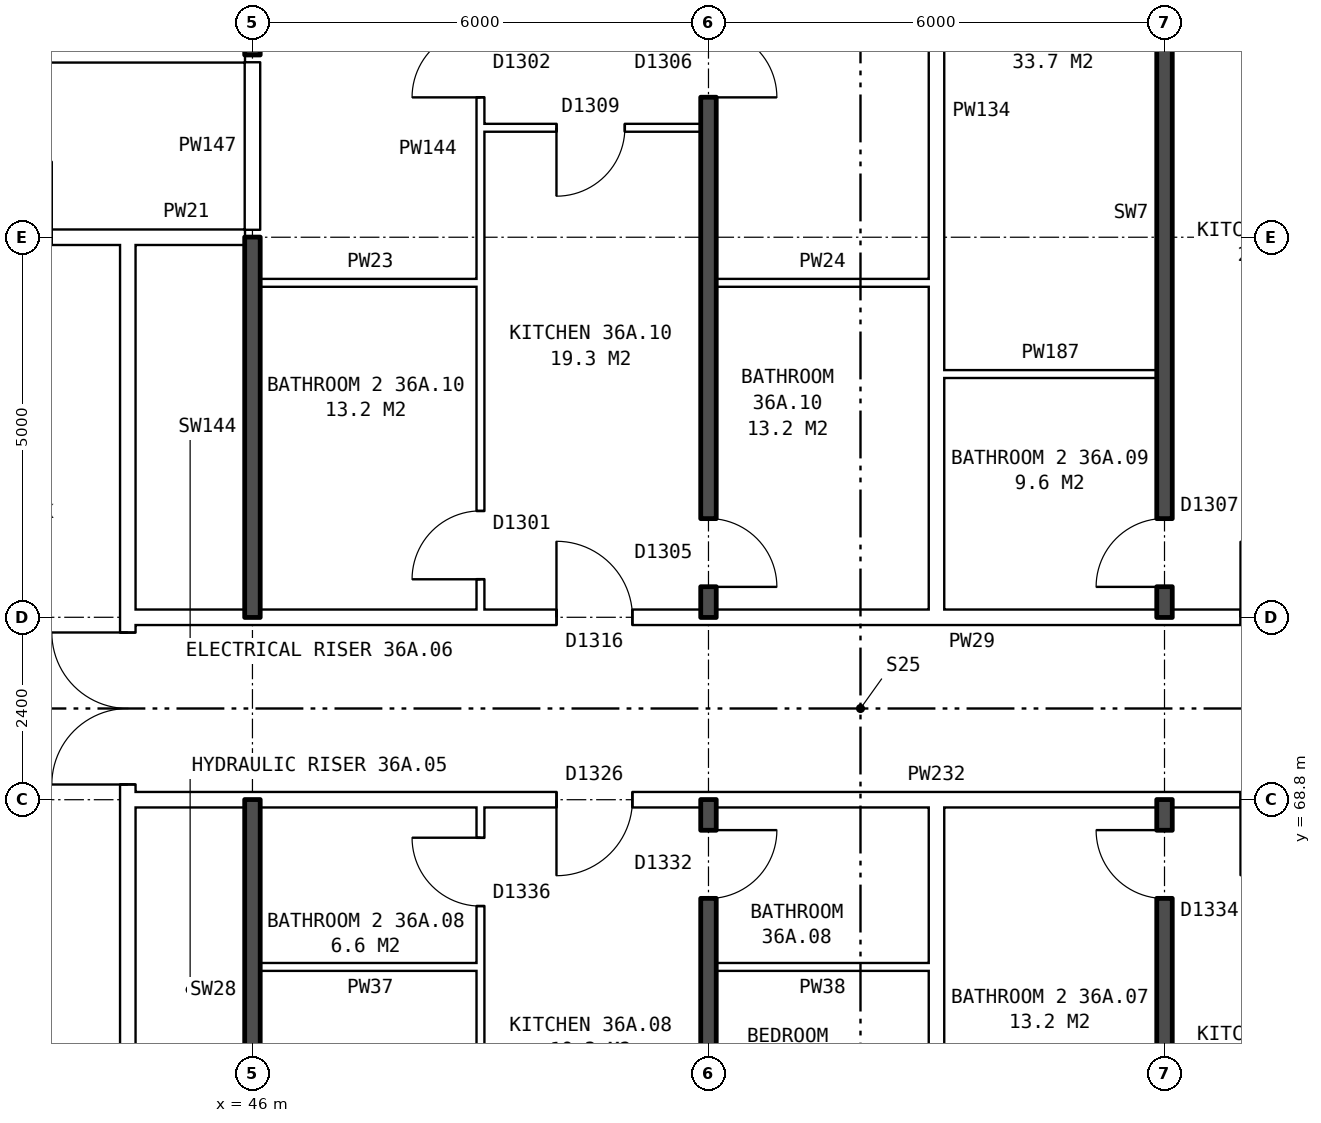
"""IFC4 building model, lengths in metres.
Left out: names, types, materials, properties, quantities, classifications, styles, units other than length and angle.
Written with IfcOpenShell. Run it as: python <this file> out.ifc"""

import sys

from ifc_helpers import new_model, si_unit, direction, frame, frame_2d, origin, place, context, subcontext, project, spatial, rectangle, extrude, element, fill, save


model = new_model("IFC4")
c1 = context("Model", 3, precision=1e-05, world=origin(), true_north=direction((0.0, 1.0)))
c2 = subcontext(c1, "Body", "Model", "MODEL_VIEW")
j1 = project(units=[si_unit("LENGTHUNIT", "METRE"), si_unit("PLANEANGLEUNIT", "RADIAN")], contexts=[c1])
p1 = place(None, origin())
s1 = spatial("IfcSite", under=j1, at=p1, CompositionType="ELEMENT")
p2 = place(p1, origin())
s2 = spatial("IfcBuilding", under=s1, at=p2, CompositionType="ELEMENT")
p3 = place(p2, frame((0.0, 0.0, 129.9)))
s3 = spatial("IfcBuildingStorey", under=s2, at=p3, CompositionType="ELEMENT", Elevation=129.9)
p4 = place(p3, frame((44.36, 63.9, 0.0), z_axis=(0.0, 0.0, 1.0), x_axis=(0.0, 1.0, 0.0)))
e1 = element("IfcWall", 1, at=p4, inside=s3, PredefinedType="PARTITIONING", context=c2, shape_type="SweptSolid", body=[
    extrude(rectangle(XDim=12.2, YDim=0.2, at=frame_2d((6.1, 0.0))), origin(), (0.0, 0.0, 1.0), 2.85),
])
p5 = place(p4, frame((5.1, 0.0, 0.0)))
e2 = element("IfcOpeningElement", 2, at=p5, cuts=e1, PredefinedType="OPENING", context=c2, shape_type="SweptSolid", body=[
    extrude(rectangle(XDim=2.0, YDim=2.1, at=frame_2d((1.0, 1.05))), frame((0.0, 0.11, 0.0), z_axis=(0.0, -1.0, 0.0), x_axis=(1.0, 0.0, 0.0)), (0.0, 0.0, 1.0), 0.22),
])
p6 = place(p3, frame((46.1, 66.6, 0.0), z_axis=(0.0, 0.0, 1.0), x_axis=(1.0, 0.0, 0.0)))
e3 = element("IfcWall", 3, at=p6, inside=s3, PredefinedType="PARTITIONING", context=c2, shape_type="SweptSolid", body=[
    extrude(rectangle(XDim=2.9, YDim=0.1, at=frame_2d((1.45, 0.0))), origin(), (0.0, 0.0, 1.0), 2.85),
])
p7 = place(p3, frame((52.1, 66.6, 0.0), z_axis=(0.0, 0.0, 1.0), x_axis=(1.0, 0.0, 0.0)))
e4 = element("IfcWall", 4, at=p7, inside=s3, PredefinedType="PARTITIONING", context=c2, shape_type="SweptSolid", body=[
    extrude(rectangle(XDim=2.8, YDim=0.1, at=frame_2d((1.4, 0.0))), origin(), (0.0, 0.0, 1.0), 2.85),
])
p8 = place(p3, frame((44.36, 68.8, 0.0), z_axis=(0.0, 0.0, 1.0), x_axis=(1.0, 0.0, 0.0)))
e5 = element("IfcWall", 5, at=p8, inside=s3, PredefinedType="PARTITIONING", context=c2, shape_type="SweptSolid", body=[
    extrude(rectangle(XDim=19.28, YDim=0.2, at=frame_2d((9.64, 0.0))), origin(), (0.0, 0.0, 1.0), 2.85),
])
p9 = place(p8, frame((14.64, 0.0, 0.0)))
e6 = element("IfcOpeningElement", 6, at=p9, cuts=e5, PredefinedType="OPENING", context=c2, shape_type="SweptSolid", body=[
    extrude(rectangle(XDim=1.0, YDim=2.1, at=frame_2d((0.5, 1.05))), frame((0.0, 0.11, 0.0), z_axis=(0.0, -1.0, 0.0), x_axis=(1.0, 0.0, 0.0)), (0.0, 0.0, 1.0), 0.22),
])
p10 = place(p8, frame((5.64, 0.0, 0.0)))
e7 = element("IfcOpeningElement", 7, at=p10, cuts=e5, PredefinedType="OPENING", context=c2, shape_type="SweptSolid", body=[
    extrude(rectangle(XDim=1.0, YDim=2.1, at=frame_2d((0.5, 1.05))), frame((0.0, 0.11, 0.0), z_axis=(0.0, -1.0, 0.0), x_axis=(1.0, 0.0, 0.0)), (0.0, 0.0, 1.0), 0.22),
])
p11 = place(p3, frame((44.36, 71.2, 0.0), z_axis=(0.0, 0.0, 1.0), x_axis=(1.0, 0.0, 0.0)))
e8 = element("IfcWall", 8, at=p11, inside=s3, PredefinedType="PARTITIONING", context=c2, shape_type="SweptSolid", body=[
    extrude(rectangle(XDim=19.28, YDim=0.2, at=frame_2d((9.64, 0.0))), origin(), (0.0, 0.0, 1.0), 2.85),
])
p12 = place(p11, frame((14.64, 0.0, 0.0)))
e9 = element("IfcOpeningElement", 9, at=p12, cuts=e8, PredefinedType="OPENING", context=c2, shape_type="SweptSolid", body=[
    extrude(rectangle(XDim=1.0, YDim=2.1, at=frame_2d((0.5, 1.05))), frame((0.0, 0.11, 0.0), z_axis=(0.0, -1.0, 0.0), x_axis=(1.0, 0.0, 0.0)), (0.0, 0.0, 1.0), 0.22),
])
p13 = place(p11, frame((5.64, 0.0, 0.0)))
e10 = element("IfcOpeningElement", 10, at=p13, cuts=e8, PredefinedType="OPENING", context=c2, shape_type="SweptSolid", body=[
    extrude(rectangle(XDim=1.0, YDim=2.1, at=frame_2d((0.5, 1.05))), frame((0.0, 0.11, 0.0), z_axis=(0.0, -1.0, 0.0), x_axis=(1.0, 0.0, 0.0)), (0.0, 0.0, 1.0), 0.22),
])
p14 = place(p3, frame((55.1, 74.4, 0.0), z_axis=(0.0, 0.0, 1.0), x_axis=(1.0, 0.0, 0.0)))
e11 = element("IfcWall", 11, at=p14, inside=s3, PredefinedType="PARTITIONING", context=c2, shape_type="SweptSolid", body=[
    extrude(rectangle(XDim=2.8, YDim=0.1, at=frame_2d((1.4, 0.0))), origin(), (0.0, 0.0, 1.0), 2.85),
])
p15 = place(p3, frame((46.1, 75.6, 0.0), z_axis=(0.0, 0.0, 1.0), x_axis=(1.0, 0.0, 0.0)))
e12 = element("IfcWall", 12, at=p15, inside=s3, PredefinedType="PARTITIONING", context=c2, shape_type="SweptSolid", body=[
    extrude(rectangle(XDim=2.9, YDim=0.1, at=frame_2d((1.45, 0.0))), origin(), (0.0, 0.0, 1.0), 2.85),
])
p16 = place(p3, frame((52.1, 75.6, 0.0), z_axis=(0.0, 0.0, 1.0), x_axis=(1.0, 0.0, 0.0)))
e13 = element("IfcWall", 13, at=p16, inside=s3, PredefinedType="PARTITIONING", context=c2, shape_type="SweptSolid", body=[
    extrude(rectangle(XDim=2.8, YDim=0.1, at=frame_2d((1.4, 0.0))), origin(), (0.0, 0.0, 1.0), 2.85),
])
p17 = place(p3, frame((41.36, 76.2, 0.0), z_axis=(0.0, 0.0, 1.0), x_axis=(1.0, 0.0, 0.0)))
e14 = element("IfcWall", 14, at=p17, inside=s3, PredefinedType="PARTITIONING", context=c2, shape_type="SweptSolid", body=[
    extrude(rectangle(XDim=3.0, YDim=0.2, at=frame_2d((1.5, 0.0))), origin(), (0.0, 0.0, 1.0), 2.85),
])
p18 = place(p17, frame((1.0, 0.0, 0.0)))
e15 = element("IfcOpeningElement", 15, at=p18, cuts=e14, PredefinedType="OPENING", context=c2, shape_type="SweptSolid", body=[
    extrude(rectangle(XDim=1.0, YDim=2.1, at=frame_2d((0.5, 1.05))), frame((0.0, 0.11, 0.0), z_axis=(0.0, -1.0, 0.0), x_axis=(1.0, 0.0, 0.0)), (0.0, 0.0, 1.0), 0.22),
])
p19 = place(p3, frame((44.36, 76.2, 0.0), z_axis=(0.0, 0.0, 1.0), x_axis=(1.0, 0.0, 0.0)))
e16 = element("IfcWall", 16, at=p19, inside=s3, PredefinedType="PARTITIONING", context=c2, shape_type="SweptSolid", body=[
    extrude(rectangle(XDim=1.54, YDim=0.2, at=frame_2d((0.77, 0.0))), origin(), (0.0, 0.0, 1.0), 2.85),
])
p20 = place(p3, frame((49.0, 77.64, 0.0), z_axis=(0.0, 0.0, 1.0), x_axis=(1.0, 0.0, 0.0)))
e17 = element("IfcWall", 17, at=p20, inside=s3, PredefinedType="PARTITIONING", context=c2, shape_type="SweptSolid", body=[
    extrude(rectangle(XDim=2.9, YDim=0.1, at=frame_2d((1.45, 0.0))), origin(), (0.0, 0.0, 1.0), 2.85),
])
p21 = place(p20, frame((1.0, 0.0, 0.0)))
e18 = element("IfcOpeningElement", 18, at=p21, cuts=e17, PredefinedType="OPENING", context=c2, shape_type="SweptSolid", body=[
    extrude(rectangle(XDim=0.9, YDim=2.1, at=frame_2d((0.45, 1.05))), frame((0.0, 0.06, 0.0), z_axis=(0.0, -1.0, 0.0), x_axis=(1.0, 0.0, 0.0)), (0.0, 0.0, 1.0), 0.12),
])
p22 = place(p3, frame((27.11, 78.6, 0.0), z_axis=(0.0, 0.0, 1.0), x_axis=(1.0, 0.0, 0.0)))
e19 = element("IfcWall", 19, at=p22, inside=s3, PredefinedType="PARTITIONING", context=c2, shape_type="SweptSolid", body=[
    extrude(rectangle(XDim=18.79, YDim=0.2, at=frame_2d((9.395, 0.0))), origin(), (0.0, 0.0, 1.0), 2.85),
])
p23 = place(p22, frame((14.19, 0.0, 0.0)))
e20 = element("IfcOpeningElement", 20, at=p23, cuts=e19, PredefinedType="OPENING", context=c2, shape_type="SweptSolid", body=[
    extrude(rectangle(XDim=1.0, YDim=2.1, at=frame_2d((0.5, 1.05))), frame((0.0, 0.11, 0.0), z_axis=(0.0, -1.0, 0.0), x_axis=(1.0, 0.0, 0.0)), (0.0, 0.0, 1.0), 0.22),
])
p24 = place(p22, frame((10.39, 0.0, 0.0)))
e21 = element("IfcOpeningElement", 21, at=p24, cuts=e19, PredefinedType="OPENING", context=c2, shape_type="SweptSolid", body=[
    extrude(rectangle(XDim=1.0, YDim=2.1, at=frame_2d((0.5, 1.05))), frame((0.0, 0.11, 0.0), z_axis=(0.0, -1.0, 0.0), x_axis=(1.0, 0.0, 0.0)), (0.0, 0.0, 1.0), 0.22),
])
p25 = place(p22, frame((4.59, 0.0, 0.0)))
e22 = element("IfcOpeningElement", 22, at=p25, cuts=e19, PredefinedType="OPENING", context=c2, shape_type="SweptSolid", body=[
    extrude(rectangle(XDim=1.0, YDim=2.1, at=frame_2d((0.5, 1.05))), frame((0.0, 0.11, 0.0), z_axis=(0.0, -1.0, 0.0), x_axis=(1.0, 0.0, 0.0)), (0.0, 0.0, 1.0), 0.22),
])
for number, where, z_axis, x_axis in (
    (23, (46.0, 63.8, 0.0), (0.0, 0.0, 1.0), (0.0, 1.0, 0.0)),
    (24, (46.0, 71.2, 0.0), (0.0, 0.0, 1.0), (0.0, 1.0, 0.0)),
):
    element("IfcWall", number, at=place(p3, frame(where, z_axis=z_axis, x_axis=x_axis)), inside=s3, PredefinedType="SOLIDWALL", context=c2, shape_type="SweptSolid", body=[
        extrude(rectangle(XDim=5.0, YDim=0.2, at=frame_2d((2.5, 0.0))), origin(), (0.0, 0.0, 1.0), 2.85),
    ])
p26 = place(p3, frame((46.0, 76.3, 0.0), z_axis=(0.0, 0.0, 1.0), x_axis=(0.0, 1.0, 0.0)))
e25 = element("IfcWall", 25, at=p26, inside=s3, PredefinedType="PARTITIONING", context=c2, shape_type="SweptSolid", body=[
    extrude(rectangle(XDim=2.2, YDim=0.2, at=frame_2d((1.1, 0.0))), origin(), (0.0, 0.0, 1.0), 2.85),
])
p27 = place(p3, frame((46.0, 78.6, 0.0), z_axis=(0.0, 0.0, 1.0), x_axis=(0.0, 1.0, 0.0)))
e26 = element("IfcWall", 26, at=p27, inside=s3, PredefinedType="SOLIDWALL", context=c2, shape_type="SweptSolid", body=[
    extrude(rectangle(XDim=7.04, YDim=0.2, at=frame_2d((3.52, 0.0))), origin(), (0.0, 0.0, 1.0), 2.85),
])
p28 = place(p3, frame((49.0, 54.36, 0.0), z_axis=(0.0, 0.0, 1.0), x_axis=(0.0, 1.0, 0.0)))
e27 = element("IfcWall", 27, at=p28, inside=s3, PredefinedType="PARTITIONING", context=c2, shape_type="SweptSolid", body=[
    extrude(rectangle(XDim=14.34, YDim=0.1, at=frame_2d((7.17, 0.0))), origin(), (0.0, 0.0, 1.0), 2.85),
])
p29 = place(p28, frame((6.7, 0.0, 0.0)))
e28 = element("IfcOpeningElement", 28, at=p29, cuts=e27, PredefinedType="OPENING", context=c2, shape_type="SweptSolid", body=[
    extrude(rectangle(XDim=0.9, YDim=2.1, at=frame_2d((0.45, 1.05))), frame((0.0, 0.06, 0.0), z_axis=(0.0, -1.0, 0.0), x_axis=(1.0, 0.0, 0.0)), (0.0, 0.0, 1.0), 0.12),
])
p30 = place(p28, frame((13.04, 0.0, 0.0)))
e29 = element("IfcOpeningElement", 29, at=p30, cuts=e27, PredefinedType="OPENING", context=c2, shape_type="SweptSolid", body=[
    extrude(rectangle(XDim=0.9, YDim=2.1, at=frame_2d((0.45, 1.05))), frame((0.0, 0.06, 0.0), z_axis=(0.0, -1.0, 0.0), x_axis=(1.0, 0.0, 0.0)), (0.0, 0.0, 1.0), 0.12),
])
p31 = place(p3, frame((49.0, 71.3, 0.0), z_axis=(0.0, 0.0, 1.0), x_axis=(0.0, 1.0, 0.0)))
e30 = element("IfcWall", 30, at=p31, inside=s3, PredefinedType="PARTITIONING", context=c2, shape_type="SweptSolid", body=[
    extrude(rectangle(XDim=14.34, YDim=0.1, at=frame_2d((7.17, 0.0))), origin(), (0.0, 0.0, 1.0), 2.85),
])
p32 = place(p31, frame((6.74, 0.0, 0.0)))
e31 = element("IfcOpeningElement", 31, at=p32, cuts=e30, PredefinedType="OPENING", context=c2, shape_type="SweptSolid", body=[
    extrude(rectangle(XDim=0.9, YDim=2.1, at=frame_2d((0.45, 1.05))), frame((0.0, 0.06, 0.0), z_axis=(0.0, -1.0, 0.0), x_axis=(1.0, 0.0, 0.0)), (0.0, 0.0, 1.0), 0.12),
])
p33 = place(p31, frame((0.4, 0.0, 0.0)))
e32 = element("IfcOpeningElement", 32, at=p33, cuts=e30, PredefinedType="OPENING", context=c2, shape_type="SweptSolid", body=[
    extrude(rectangle(XDim=0.9, YDim=2.1, at=frame_2d((0.45, 1.05))), frame((0.0, 0.06, 0.0), z_axis=(0.0, -1.0, 0.0), x_axis=(1.0, 0.0, 0.0)), (0.0, 0.0, 1.0), 0.12),
])
p34 = place(p3, frame((52.0, 54.36, 0.0), z_axis=(0.0, 0.0, 1.0), x_axis=(0.0, 1.0, 0.0)))
e33 = element("IfcWall", 33, at=p34, inside=s3, PredefinedType="SOLIDWALL", context=c2, shape_type="SweptSolid", body=[
    extrude(rectangle(XDim=14.44, YDim=0.2, at=frame_2d((7.22, 0.0))), origin(), (0.0, 0.0, 1.0), 2.85),
])
p35 = place(p34, frame((6.7, 0.0, 0.0)))
e34 = element("IfcOpeningElement", 34, at=p35, cuts=e33, PredefinedType="OPENING", context=c2, shape_type="SweptSolid", body=[
    extrude(rectangle(XDim=0.9, YDim=2.1, at=frame_2d((0.45, 1.05))), frame((0.0, 0.11, 0.0), z_axis=(0.0, -1.0, 0.0), x_axis=(1.0, 0.0, 0.0)), (0.0, 0.0, 1.0), 0.22),
])
p36 = place(p34, frame((13.14, 0.0, 0.0)))
e35 = element("IfcOpeningElement", 35, at=p36, cuts=e33, PredefinedType="OPENING", context=c2, shape_type="SweptSolid", body=[
    extrude(rectangle(XDim=0.9, YDim=2.1, at=frame_2d((0.45, 1.05))), frame((0.0, 0.11, 0.0), z_axis=(0.0, -1.0, 0.0), x_axis=(1.0, 0.0, 0.0)), (0.0, 0.0, 1.0), 0.22),
])
p37 = place(p3, frame((52.0, 71.2, 0.0), z_axis=(0.0, 0.0, 1.0), x_axis=(0.0, 1.0, 0.0)))
e36 = element("IfcWall", 36, at=p37, inside=s3, PredefinedType="SOLIDWALL", context=c2, shape_type="SweptSolid", body=[
    extrude(rectangle(XDim=14.44, YDim=0.2, at=frame_2d((7.22, 0.0))), origin(), (0.0, 0.0, 1.0), 2.85),
])
p38 = place(p37, frame((6.84, 0.0, 0.0)))
e37 = element("IfcOpeningElement", 37, at=p38, cuts=e36, PredefinedType="OPENING", context=c2, shape_type="SweptSolid", body=[
    extrude(rectangle(XDim=0.9, YDim=2.1, at=frame_2d((0.45, 1.05))), frame((0.0, 0.11, 0.0), z_axis=(0.0, -1.0, 0.0), x_axis=(1.0, 0.0, 0.0)), (0.0, 0.0, 1.0), 0.22),
])
p39 = place(p37, frame((0.4, 0.0, 0.0)))
e38 = element("IfcOpeningElement", 38, at=p39, cuts=e36, PredefinedType="OPENING", context=c2, shape_type="SweptSolid", body=[
    extrude(rectangle(XDim=0.9, YDim=2.1, at=frame_2d((0.45, 1.05))), frame((0.0, 0.11, 0.0), z_axis=(0.0, -1.0, 0.0), x_axis=(1.0, 0.0, 0.0)), (0.0, 0.0, 1.0), 0.22),
])
for number, where, z_axis, x_axis in (
    (39, (55.0, 54.36, 0.0), (0.0, 0.0, 1.0), (0.0, 1.0, 0.0)),
    (40, (55.0, 71.3, 0.0), (0.0, 0.0, 1.0), (0.0, 1.0, 0.0)),
):
    element("IfcWall", number, at=place(p3, frame(where, z_axis=z_axis, x_axis=x_axis)), inside=s3, PredefinedType="PARTITIONING", context=c2, shape_type="SweptSolid", body=[
        extrude(rectangle(XDim=14.34, YDim=0.2, at=frame_2d((7.17, 0.0))), origin(), (0.0, 0.0, 1.0), 2.85),
    ])
p40 = place(p3, frame((58.0, 54.36, 0.0), z_axis=(0.0, 0.0, 1.0), x_axis=(0.0, 1.0, 0.0)))
e41 = element("IfcWall", 41, at=p40, inside=s3, PredefinedType="SOLIDWALL", context=c2, shape_type="SweptSolid", body=[
    extrude(rectangle(XDim=14.44, YDim=0.2, at=frame_2d((7.22, 0.0))), origin(), (0.0, 0.0, 1.0), 2.85),
])
p41 = place(p40, frame((4.2, 0.0, 0.0)))
e42 = element("IfcOpeningElement", 42, at=p41, cuts=e41, PredefinedType="OPENING", context=c2, shape_type="SweptSolid", body=[
    extrude(rectangle(XDim=0.9, YDim=2.1, at=frame_2d((0.45, 1.05))), frame((0.0, 0.11, 0.0), z_axis=(0.0, -1.0, 0.0), x_axis=(1.0, 0.0, 0.0)), (0.0, 0.0, 1.0), 0.22),
])
p42 = place(p40, frame((13.14, 0.0, 0.0)))
e43 = element("IfcOpeningElement", 43, at=p42, cuts=e41, PredefinedType="OPENING", context=c2, shape_type="SweptSolid", body=[
    extrude(rectangle(XDim=0.9, YDim=2.1, at=frame_2d((0.45, 1.05))), frame((0.0, 0.11, 0.0), z_axis=(0.0, -1.0, 0.0), x_axis=(1.0, 0.0, 0.0)), (0.0, 0.0, 1.0), 0.22),
])
p43 = place(p3, frame((58.0, 71.2, 0.0), z_axis=(0.0, 0.0, 1.0), x_axis=(0.0, 1.0, 0.0)))
e44 = element("IfcWall", 44, at=p43, inside=s3, PredefinedType="SOLIDWALL", context=c2, shape_type="SweptSolid", body=[
    extrude(rectangle(XDim=14.44, YDim=0.2, at=frame_2d((7.22, 0.0))), origin(), (0.0, 0.0, 1.0), 2.85),
])
p44 = place(p43, frame((9.34, 0.0, 0.0)))
e45 = element("IfcOpeningElement", 45, at=p44, cuts=e44, PredefinedType="OPENING", context=c2, shape_type="SweptSolid", body=[
    extrude(rectangle(XDim=0.9, YDim=2.1, at=frame_2d((0.45, 1.05))), frame((0.0, 0.11, 0.0), z_axis=(0.0, -1.0, 0.0), x_axis=(1.0, 0.0, 0.0)), (0.0, 0.0, 1.0), 0.22),
])
p45 = place(p43, frame((0.4, 0.0, 0.0)))
e46 = element("IfcOpeningElement", 46, at=p45, cuts=e44, PredefinedType="OPENING", context=c2, shape_type="SweptSolid", body=[
    extrude(rectangle(XDim=0.9, YDim=2.1, at=frame_2d((0.45, 1.05))), frame((0.0, 0.11, 0.0), z_axis=(0.0, -1.0, 0.0), x_axis=(1.0, 0.0, 0.0)), (0.0, 0.0, 1.0), 0.22),
])
p46 = place(p5, origin())
e47 = element("IfcDoor", 47, at=p46, inside=s3, OperationType="DOUBLE_DOOR_SINGLE_SWING", PredefinedType="DOOR", context=c2, shape_type="SweptSolid", body=[
    extrude(rectangle(XDim=2.0, YDim=2.1, at=frame_2d((1.0, 1.05))), frame((0.0, 0.025, 0.0), z_axis=(0.0, -1.0, 0.0), x_axis=(1.0, 0.0, 0.0)), (0.0, 0.0, 1.0), 0.05),
])
fill(e2, e47)
p47 = place(p42, origin())
e48 = element("IfcDoor", 48, at=p47, inside=s3, OperationType="SINGLE_SWING_RIGHT", PredefinedType="DOOR", context=c2, shape_type="SweptSolid", body=[
    extrude(rectangle(XDim=0.9, YDim=2.1, at=frame_2d((0.45, 1.05))), frame((0.0, 0.025, 0.0), z_axis=(0.0, -1.0, 0.0), x_axis=(1.0, 0.0, 0.0)), (0.0, 0.0, 1.0), 0.05),
])
fill(e43, e48)
p48 = place(p10, frame((1.0, 0.0, 0.0), z_axis=(0.0, 0.0, 1.0), x_axis=(-1.0, 0.0, 0.0)))
e49 = element("IfcDoor", 49, at=p48, inside=s3, OperationType="SINGLE_SWING_RIGHT", PredefinedType="DOOR", context=c2, shape_type="SweptSolid", body=[
    extrude(rectangle(XDim=1.0, YDim=2.1, at=frame_2d((0.5, 1.05))), frame((0.0, 0.025, 0.0), z_axis=(0.0, -1.0, 0.0), x_axis=(1.0, 0.0, 0.0)), (0.0, 0.0, 1.0), 0.05),
])
fill(e7, e49)
p49 = place(p36, frame((0.9, 0.0, 0.0), z_axis=(0.0, 0.0, 1.0), x_axis=(-1.0, 0.0, 0.0)))
e50 = element("IfcDoor", 50, at=p49, inside=s3, OperationType="SINGLE_SWING_LEFT", PredefinedType="DOOR", context=c2, shape_type="SweptSolid", body=[
    extrude(rectangle(XDim=0.9, YDim=2.1, at=frame_2d((0.45, 1.05))), frame((0.0, 0.025, 0.0), z_axis=(0.0, -1.0, 0.0), x_axis=(1.0, 0.0, 0.0)), (0.0, 0.0, 1.0), 0.05),
])
fill(e35, e50)
p50 = place(p30, origin())
e51 = element("IfcDoor", 51, at=p50, inside=s3, OperationType="SINGLE_SWING_RIGHT", PredefinedType="DOOR", context=c2, shape_type="SweptSolid", body=[
    extrude(rectangle(XDim=0.9, YDim=2.1, at=frame_2d((0.45, 1.05))), frame((0.0, 0.025, 0.0), z_axis=(0.0, -1.0, 0.0), x_axis=(1.0, 0.0, 0.0)), (0.0, 0.0, 1.0), 0.05),
])
fill(e29, e51)
p51 = place(p45, origin())
e52 = element("IfcDoor", 52, at=p51, inside=s3, OperationType="SINGLE_SWING_LEFT", PredefinedType="DOOR", context=c2, shape_type="SweptSolid", body=[
    extrude(rectangle(XDim=0.9, YDim=2.1, at=frame_2d((0.45, 1.05))), frame((0.0, 0.025, 0.0), z_axis=(0.0, -1.0, 0.0), x_axis=(1.0, 0.0, 0.0)), (0.0, 0.0, 1.0), 0.05),
])
fill(e46, e52)
p52 = place(p38, frame((0.9, 0.0, 0.0), z_axis=(0.0, 0.0, 1.0), x_axis=(-1.0, 0.0, 0.0)))
e53 = element("IfcDoor", 53, at=p52, inside=s3, OperationType="SINGLE_SWING_RIGHT", PredefinedType="DOOR", context=c2, shape_type="SweptSolid", body=[
    extrude(rectangle(XDim=0.9, YDim=2.1, at=frame_2d((0.45, 1.05))), frame((0.0, 0.025, 0.0), z_axis=(0.0, -1.0, 0.0), x_axis=(1.0, 0.0, 0.0)), (0.0, 0.0, 1.0), 0.05),
])
fill(e37, e53)
p53 = place(p32, origin())
e54 = element("IfcDoor", 54, at=p53, inside=s3, OperationType="SINGLE_SWING_LEFT", PredefinedType="DOOR", context=c2, shape_type="SweptSolid", body=[
    extrude(rectangle(XDim=0.9, YDim=2.1, at=frame_2d((0.45, 1.05))), frame((0.0, 0.025, 0.0), z_axis=(0.0, -1.0, 0.0), x_axis=(1.0, 0.0, 0.0)), (0.0, 0.0, 1.0), 0.05),
])
fill(e31, e54)
p54 = place(p13, origin())
e55 = element("IfcDoor", 55, at=p54, inside=s3, OperationType="SINGLE_SWING_LEFT", PredefinedType="DOOR", context=c2, shape_type="SweptSolid", body=[
    extrude(rectangle(XDim=1.0, YDim=2.1, at=frame_2d((0.5, 1.05))), frame((0.0, 0.025, 0.0), z_axis=(0.0, -1.0, 0.0), x_axis=(1.0, 0.0, 0.0)), (0.0, 0.0, 1.0), 0.05),
])
fill(e10, e55)
p55 = place(p21, frame((0.9, 0.0, 0.0), z_axis=(0.0, 0.0, 1.0), x_axis=(-1.0, 0.0, 0.0)))
e56 = element("IfcDoor", 56, at=p55, inside=s3, OperationType="SINGLE_SWING_RIGHT", PredefinedType="DOOR", context=c2, shape_type="SweptSolid", body=[
    extrude(rectangle(XDim=0.9, YDim=2.1, at=frame_2d((0.45, 1.05))), frame((0.0, 0.025, 0.0), z_axis=(0.0, -1.0, 0.0), x_axis=(1.0, 0.0, 0.0)), (0.0, 0.0, 1.0), 0.05),
])
fill(e18, e56)
p56 = place(p39, frame((0.9, 0.0, 0.0), z_axis=(0.0, 0.0, 1.0), x_axis=(-1.0, 0.0, 0.0)))
e57 = element("IfcDoor", 57, at=p56, inside=s3, OperationType="SINGLE_SWING_RIGHT", PredefinedType="DOOR", context=c2, shape_type="SweptSolid", body=[
    extrude(rectangle(XDim=0.9, YDim=2.1, at=frame_2d((0.45, 1.05))), frame((0.0, 0.025, 0.0), z_axis=(0.0, -1.0, 0.0), x_axis=(1.0, 0.0, 0.0)), (0.0, 0.0, 1.0), 0.05),
])
fill(e38, e57)
p57 = place(p33, origin())
e58 = element("IfcDoor", 58, at=p57, inside=s3, OperationType="SINGLE_SWING_LEFT", PredefinedType="DOOR", context=c2, shape_type="SweptSolid", body=[
    extrude(rectangle(XDim=0.9, YDim=2.1, at=frame_2d((0.45, 1.05))), frame((0.0, 0.025, 0.0), z_axis=(0.0, -1.0, 0.0), x_axis=(1.0, 0.0, 0.0)), (0.0, 0.0, 1.0), 0.05),
])
fill(e32, e58)
save(model, sys.argv[1])
